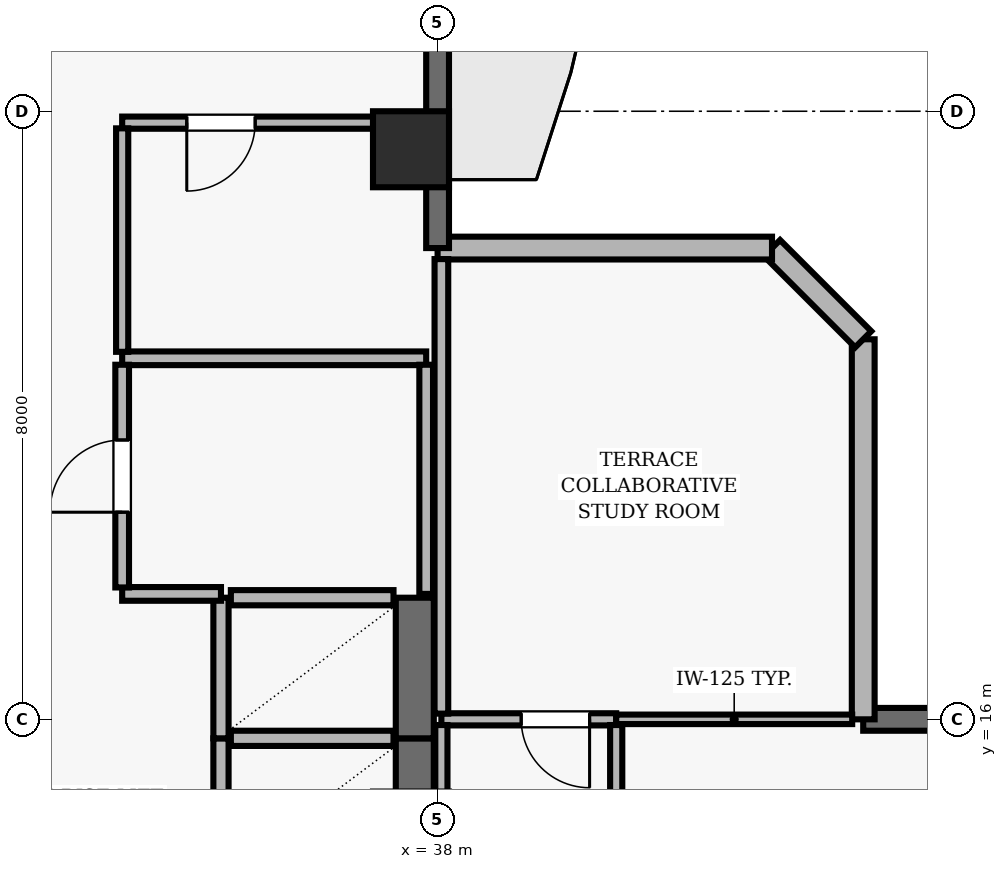
"""IFC4 building model, lengths in metres.
Left out: names, types, materials, properties, quantities, classifications, styles, units other than length and angle.
Written with IfcOpenShell. Run it as: python <this file> out.ifc"""

import sys

from ifc_helpers import new_model, si_unit, direction, frame, frame_2d, origin, origin_2d, place, context, subcontext, project, spatial, rectangle, extrude, element, fill, save


model = new_model("IFC4")
c1 = context("Model", 3, precision=1e-05, world=origin(), true_north=direction((0.0, 1.0)))
c2 = subcontext(c1, "Body", "Model", "MODEL_VIEW")
j1 = project(units=[si_unit("LENGTHUNIT", "METRE"), si_unit("PLANEANGLEUNIT", "RADIAN")], contexts=[c1])
p1 = place(None, origin())
s1 = spatial("IfcSite", under=j1, at=p1, CompositionType="ELEMENT")
p2 = place(p1, origin())
s2 = spatial("IfcBuilding", under=s1, at=p2, CompositionType="ELEMENT")
p3 = place(p2, frame((0.0, 0.0, 222.6)))
s3 = spatial("IfcBuildingStorey", under=s2, at=p3, CompositionType="ELEMENT", Elevation=222.6)
p4 = place(p3, frame((37.65, 23.5, 0.0), z_axis=(0.0, 0.0, 1.0), x_axis=(1.0, 0.0, 0.0)))
e1 = element("IfcColumn", 1, at=p4, inside=s3, PredefinedType="COLUMN", context=c2, shape_type="SweptSolid", body=[
    extrude(rectangle(XDim=1.0, YDim=1.0, at=origin_2d()), origin(), (0.0, 0.0, 1.0), 3.9),
])
p5 = place(p3, frame((62.7, 16.0, 0.0), z_axis=(0.0, 0.0, 1.0), x_axis=(-1.0, 0.0, 0.0)))
e2 = element("IfcWall", 2, at=p5, inside=s3, PredefinedType="SOLIDWALL", context=c2, shape_type="SweptSolid", body=[
    extrude(rectangle(XDim=19.1, YDim=0.3, at=frame_2d((9.55, 0.0))), origin(), (0.0, 0.0, 1.0), 3.69),
])
p6 = place(p5, frame((7.55, 0.0, 0.0)))
e3 = element("IfcOpeningElement", 3, at=p6, cuts=e2, PredefinedType="OPENING", context=c2, shape_type="SweptSolid", body=[
    extrude(rectangle(XDim=1.0, YDim=2.2, at=frame_2d((0.5, 1.1))), frame((0.0, 0.16, 0.0), z_axis=(0.0, -1.0, 0.0), x_axis=(1.0, 0.0, 0.0)), (0.0, 0.0, 1.0), 0.32),
])
p7 = place(p5, frame((1.983, 0.0, 0.9)))
e4 = element("IfcOpeningElement", 4, at=p7, cuts=e2, PredefinedType="OPENING", context=c2, shape_type="SweptSolid", body=[
    extrude(rectangle(XDim=2.4, YDim=2.2, at=frame_2d((1.2, 1.1))), frame((0.0, 0.16, 0.0), z_axis=(0.0, -1.0, 0.0), x_axis=(1.0, 0.0, 0.0)), (0.0, 0.0, 1.0), 0.32),
])
p8 = place(p5, frame((9.25, 0.0, 0.9)))
e5 = element("IfcOpeningElement", 5, at=p8, cuts=e2, PredefinedType="OPENING", context=c2, shape_type="SweptSolid", body=[
    extrude(rectangle(XDim=2.4, YDim=2.2, at=frame_2d((1.2, 1.1))), frame((0.0, 0.16, 0.0), z_axis=(0.0, -1.0, 0.0), x_axis=(1.0, 0.0, 0.0)), (0.0, 0.0, 1.0), 0.32),
])
p9 = place(p5, frame((15.617, 0.0, 0.9)))
e6 = element("IfcOpeningElement", 6, at=p9, cuts=e2, PredefinedType="OPENING", context=c2, shape_type="SweptSolid", body=[
    extrude(rectangle(XDim=2.4, YDim=2.2, at=frame_2d((1.2, 1.1))), frame((0.0, 0.16, 0.0), z_axis=(0.0, -1.0, 0.0), x_axis=(1.0, 0.0, 0.0)), (0.0, 0.0, 1.0), 0.32),
])
p10 = place(p3, frame((43.6, 16.0, 0.0), z_axis=(0.0, 0.0, 1.0), x_axis=(0.0, 1.0, 0.0)))
e7 = element("IfcWall", 7, at=p10, inside=s3, PredefinedType="SOLIDWALL", context=c2, shape_type="SweptSolid", body=[
    extrude(rectangle(XDim=5.0, YDim=0.3, at=frame_2d((2.5, 0.0))), origin(), (0.0, 0.0, 1.0), 3.69),
])
p11 = place(p3, frame((43.6, 21.0, 0.0), z_axis=(0.0, 0.0, 1.0), x_axis=(-0.707178703759, 0.707034851297, 0.0)))
e8 = element("IfcWall", 8, at=p11, inside=s3, PredefinedType="SOLIDWALL", context=c2, shape_type="SweptSolid", body=[
    extrude(rectangle(XDim=1.697, YDim=0.3, at=frame_2d((0.849, 0.0))), origin(), (0.0, 0.0, 1.0), 3.69),
])
p12 = place(p3, frame((42.4, 22.2, 0.0), z_axis=(0.0, 0.0, 1.0), x_axis=(-1.0, 0.0, 0.0)))
e9 = element("IfcWall", 9, at=p12, inside=s3, PredefinedType="SOLIDWALL", context=c2, shape_type="SweptSolid", body=[
    extrude(rectangle(XDim=4.4, YDim=0.3, at=frame_2d((2.2, 0.0))), origin(), (0.0, 0.0, 1.0), 3.69),
])
p13 = place(p3, frame((38.0, 22.2, 0.0), z_axis=(0.0, 0.0, 1.0), x_axis=(0.0, 1.0, 0.0)))
e10 = element("IfcWall", 10, at=p13, inside=s3, PredefinedType="SOLIDWALL", context=c2, shape_type="SweptSolid", body=[
    extrude(rectangle(XDim=18.5, YDim=0.3, at=frame_2d((9.25, 0.0))), origin(), (0.0, 0.0, 1.0), 3.69),
])
p14 = place(p13, frame((9.95, 0.0, 0.0)))
e11 = element("IfcOpeningElement", 11, at=p14, cuts=e10, PredefinedType="OPENING", context=c2, shape_type="SweptSolid", body=[
    extrude(rectangle(XDim=1.0, YDim=2.2, at=frame_2d((0.5, 1.1))), frame((0.0, 0.16, 0.0), z_axis=(0.0, -1.0, 0.0), x_axis=(1.0, 0.0, 0.0)), (0.0, 0.0, 1.0), 0.32),
])
p15 = place(p13, frame((14.517, 0.0, 0.9)))
e12 = element("IfcOpeningElement", 12, at=p15, cuts=e10, PredefinedType="OPENING", context=c2, shape_type="SweptSolid", body=[
    extrude(rectangle(XDim=1.8, YDim=1.6, at=frame_2d((0.9, 0.8))), frame((0.0, 0.16, 0.0), z_axis=(0.0, -1.0, 0.0), x_axis=(1.0, 0.0, 0.0)), (0.0, 0.0, 1.0), 0.32),
])
p16 = place(p3, frame((35.15, 15.75, 0.0), z_axis=(0.0, 0.0, 1.0), x_axis=(0.0, -1.0, 0.0)))
e13 = element("IfcWall", 13, at=p16, inside=s3, PredefinedType="SOLIDWALL", context=c2, shape_type="SweptSolid", body=[
    extrude(rectangle(XDim=1.85, YDim=0.2, at=frame_2d((0.925, 0.0))), origin(), (0.0, 0.0, 1.0), 3.69),
])
p17 = place(p3, frame((37.7, 13.9, 0.0), z_axis=(0.0, 0.0, 1.0), x_axis=(0.0, 1.0, 0.0)))
e14 = element("IfcWall", 14, at=p17, inside=s3, PredefinedType="SHEAR", context=c2, shape_type="SweptSolid", body=[
    extrude(rectangle(XDim=1.85, YDim=0.5, at=frame_2d((0.925, 0.0))), origin(), (0.0, 0.0, 1.0), 3.69),
])
p18 = place(p3, frame((37.42, 15.75, 0.0), z_axis=(0.0, 0.0, 1.0), x_axis=(-1.0, 0.0, 0.0)))
e15 = element("IfcWall", 15, at=p18, inside=s3, PredefinedType="SOLIDWALL", context=c2, shape_type="SweptSolid", body=[
    extrude(rectangle(XDim=2.14, YDim=0.2, at=frame_2d((1.07, 0.0))), origin(), (0.0, 0.0, 1.0), 3.69),
])
p19 = place(p3, frame((35.15, 17.6, 0.0), z_axis=(0.0, 0.0, 1.0), x_axis=(0.0, -1.0, 0.0)))
e16 = element("IfcWall", 16, at=p19, inside=s3, PredefinedType="SOLIDWALL", context=c2, shape_type="SweptSolid", body=[
    extrude(rectangle(XDim=1.85, YDim=0.2, at=frame_2d((0.925, 0.0))), origin(), (0.0, 0.0, 1.0), 3.69),
])
p20 = place(p3, frame((37.7, 15.75, 0.0), z_axis=(0.0, 0.0, 1.0), x_axis=(0.0, 1.0, 0.0)))
e17 = element("IfcWall", 17, at=p20, inside=s3, PredefinedType="SHEAR", context=c2, shape_type="SweptSolid", body=[
    extrude(rectangle(XDim=1.85, YDim=0.5, at=frame_2d((0.925, 0.0))), origin(), (0.0, 0.0, 1.0), 3.69),
])
p21 = place(p3, frame((37.42, 17.6, 0.0), z_axis=(0.0, 0.0, 1.0), x_axis=(-1.0, 0.0, 0.0)))
e18 = element("IfcWall", 18, at=p21, inside=s3, PredefinedType="SOLIDWALL", context=c2, shape_type="SweptSolid", body=[
    extrude(rectangle(XDim=2.14, YDim=0.2, at=frame_2d((1.07, 0.0))), origin(), (0.0, 0.0, 1.0), 3.69),
])
p22 = place(p3, frame((33.85, 17.65, 0.0), z_axis=(0.0, 0.0, 1.0), x_axis=(1.0, 0.0, 0.0)))
e19 = element("IfcWall", 19, at=p22, inside=s3, PredefinedType="PARTITIONING", context=c2, shape_type="SweptSolid", body=[
    extrude(rectangle(XDim=1.3, YDim=0.18, at=frame_2d((0.65, 0.0))), origin(), (0.0, 0.0, 1.0), 3.69),
])
p23 = place(p3, frame((37.85, 20.75, 0.0), z_axis=(0.0, 0.0, 1.0), x_axis=(-1.0, 0.0, 0.0)))
e20 = element("IfcWall", 20, at=p23, inside=s3, PredefinedType="PARTITIONING", context=c2, shape_type="SweptSolid", body=[
    extrude(rectangle(XDim=4.0, YDim=0.18, at=frame_2d((2.0, 0.0))), origin(), (0.0, 0.0, 1.0), 3.69),
])
p24 = place(p3, frame((37.85, 23.85, 0.0), z_axis=(0.0, 0.0, 1.0), x_axis=(-1.0, 0.0, 0.0)))
e21 = element("IfcWall", 21, at=p24, inside=s3, PredefinedType="PARTITIONING", context=c2, shape_type="SweptSolid", body=[
    extrude(rectangle(XDim=4.0, YDim=0.16, at=frame_2d((2.0, 0.0))), origin(), (0.0, 0.0, 1.0), 3.139),
])
p25 = place(p24, frame((2.25, 0.0, 0.0)))
e22 = element("IfcOpeningElement", 22, at=p25, cuts=e21, PredefinedType="OPENING", context=c2, shape_type="SweptSolid", body=[
    extrude(rectangle(XDim=0.9, YDim=2.1, at=frame_2d((0.45, 1.05))), frame((0.0, 0.09, 0.0), z_axis=(0.0, -1.0, 0.0), x_axis=(1.0, 0.0, 0.0)), (0.0, 0.0, 1.0), 0.18),
])
p26 = place(p3, frame((40.35, 16.0, 0.0), z_axis=(0.0, 0.0, 1.0), x_axis=(-1.0, 0.0, 0.0)))
e23 = element("IfcWall", 23, at=p26, inside=s3, PredefinedType="PARTITIONING", context=c2, shape_type="SweptSolid", body=[
    extrude(rectangle(XDim=2.3, YDim=0.16, at=frame_2d((1.15, 0.0))), origin(), (0.0, 0.0, 1.0), 3.39),
])
p27 = place(p26, frame((0.35, 0.0, 0.0)))
e24 = element("IfcOpeningElement", 24, at=p27, cuts=e23, PredefinedType="OPENING", context=c2, shape_type="SweptSolid", body=[
    extrude(rectangle(XDim=0.9, YDim=2.1, at=frame_2d((0.45, 1.05))), frame((0.0, 0.09, 0.0), z_axis=(0.0, -1.0, 0.0), x_axis=(1.0, 0.0, 0.0)), (0.0, 0.0, 1.0), 0.18),
])
p28 = place(p3, frame((40.35, 16.0, 0.0), z_axis=(0.0, 0.0, 1.0), x_axis=(1.0, 0.0, 0.0)))
e25 = element("IfcWall", 25, at=p28, inside=s3, PredefinedType="PARTITIONING", context=c2, shape_type="SweptSolid", body=[
    extrude(rectangle(XDim=3.105, YDim=0.125, at=frame_2d((1.552, 0.0))), origin(), (0.0, 0.0, 1.0), 3.39),
])
p29 = place(p3, frame((33.85, 17.735, 0.0), z_axis=(0.0, 0.0, 1.0), x_axis=(0.0, 1.0, 0.0)))
e26 = element("IfcWall", 26, at=p29, inside=s3, PredefinedType="PARTITIONING", context=c2, shape_type="SweptSolid", body=[
    extrude(rectangle(XDim=2.93, YDim=0.18, at=frame_2d((1.465, 0.0))), origin(), (0.0, 0.0, 1.0), 3.69),
])
p30 = place(p29, frame((0.99, 0.0, 0.0)))
e27 = element("IfcOpeningElement", 27, at=p30, cuts=e26, PredefinedType="OPENING", context=c2, shape_type="SweptSolid", body=[
    extrude(rectangle(XDim=0.95, YDim=2.1, at=frame_2d((0.475, 1.05))), frame((0.0, 0.1, 0.0), z_axis=(0.0, -1.0, 0.0), x_axis=(1.0, 0.0, 0.0)), (0.0, 0.0, 1.0), 0.2),
])
p31 = place(p3, frame((33.85, 20.835, 0.0), z_axis=(0.0, 0.0, 1.0), x_axis=(0.0, 1.0, 0.0)))
e28 = element("IfcWall", 28, at=p31, inside=s3, PredefinedType="PARTITIONING", context=c2, shape_type="SweptSolid", body=[
    extrude(rectangle(XDim=2.94, YDim=0.16, at=frame_2d((1.47, 0.0))), origin(), (0.0, 0.0, 1.0), 3.69),
])
p32 = place(p3, frame((37.85, 17.65, 0.0), z_axis=(0.0, 0.0, 1.0), x_axis=(0.0, 1.0, 0.0)))
e29 = element("IfcWall", 29, at=p32, inside=s3, PredefinedType="PARTITIONING", context=c2, shape_type="SweptSolid", body=[
    extrude(rectangle(XDim=3.015, YDim=0.18, at=frame_2d((1.508, 0.0))), origin(), (0.0, 0.0, 1.0), 3.139),
])
p33 = place(p3, frame((38.05, 15.925, 0.0), z_axis=(0.0, 0.0, 1.0), x_axis=(0.0, -1.0, 0.0)))
e30 = element("IfcWall", 30, at=p33, inside=s3, PredefinedType="PARTITIONING", context=c2, shape_type="SweptSolid", body=[
    extrude(rectangle(XDim=6.375, YDim=0.16, at=frame_2d((3.188, 0.0))), origin(), (0.0, 0.0, 1.0), 3.139),
])
p34 = place(p3, frame((38.05, 22.055, 0.0), z_axis=(0.0, 0.0, 1.0), x_axis=(0.0, -1.0, 0.0)))
e31 = element("IfcWall", 31, at=p34, inside=s3, PredefinedType="PARTITIONING", context=c2, shape_type="SweptSolid", body=[
    extrude(rectangle(XDim=5.98, YDim=0.18, at=frame_2d((2.99, 0.0))), origin(), (0.0, 0.0, 1.0), 3.139),
])
p35 = place(p3, frame((40.35, 7.625, 0.0), z_axis=(0.0, 0.0, 1.0), x_axis=(0.0, 1.0, 0.0)))
e32 = element("IfcWall", 32, at=p35, inside=s3, PredefinedType="PARTITIONING", context=c2, shape_type="SweptSolid", body=[
    extrude(rectangle(XDim=8.3, YDim=0.16, at=frame_2d((4.15, 0.0))), origin(), (0.0, 0.0, 1.0), 3.69),
])
p36 = place(p35, frame((3.7, 0.0, 0.0)))
e33 = element("IfcOpeningElement", 33, at=p36, cuts=e32, PredefinedType="OPENING", context=c2, shape_type="SweptSolid", body=[
    extrude(rectangle(XDim=0.9, YDim=2.1, at=frame_2d((0.45, 1.05))), frame((0.0, 0.09, 0.0), z_axis=(0.0, -1.0, 0.0), x_axis=(1.0, 0.0, 0.0)), (0.0, 0.0, 1.0), 0.18),
])
p37 = place(p30, origin())
e34 = element("IfcDoor", 34, at=p37, inside=s3, OperationType="SINGLE_SWING_LEFT", PredefinedType="DOOR", context=c2, shape_type="SweptSolid", body=[
    extrude(rectangle(XDim=0.95, YDim=2.1, at=frame_2d((0.475, 1.05))), frame((0.0, 0.025, 0.0), z_axis=(0.0, -1.0, 0.0), x_axis=(1.0, 0.0, 0.0)), (0.0, 0.0, 1.0), 0.05),
])
fill(e27, e34)
p38 = place(p25, origin())
e35 = element("IfcDoor", 35, at=p38, inside=s3, OperationType="SINGLE_SWING_RIGHT", PredefinedType="DOOR", context=c2, shape_type="SweptSolid", body=[
    extrude(rectangle(XDim=0.9, YDim=2.1, at=frame_2d((0.45, 1.05))), frame((0.0, 0.025, 0.0), z_axis=(0.0, -1.0, 0.0), x_axis=(1.0, 0.0, 0.0)), (0.0, 0.0, 1.0), 0.05),
])
fill(e22, e35)
p39 = place(p27, origin())
e36 = element("IfcDoor", 36, at=p39, inside=s3, OperationType="SINGLE_SWING_LEFT", PredefinedType="DOOR", context=c2, shape_type="SweptSolid", body=[
    extrude(rectangle(XDim=0.9, YDim=2.1, at=frame_2d((0.45, 1.05))), frame((0.0, 0.025, 0.0), z_axis=(0.0, -1.0, 0.0), x_axis=(1.0, 0.0, 0.0)), (0.0, 0.0, 1.0), 0.05),
])
fill(e24, e36)
save(model, sys.argv[1])
